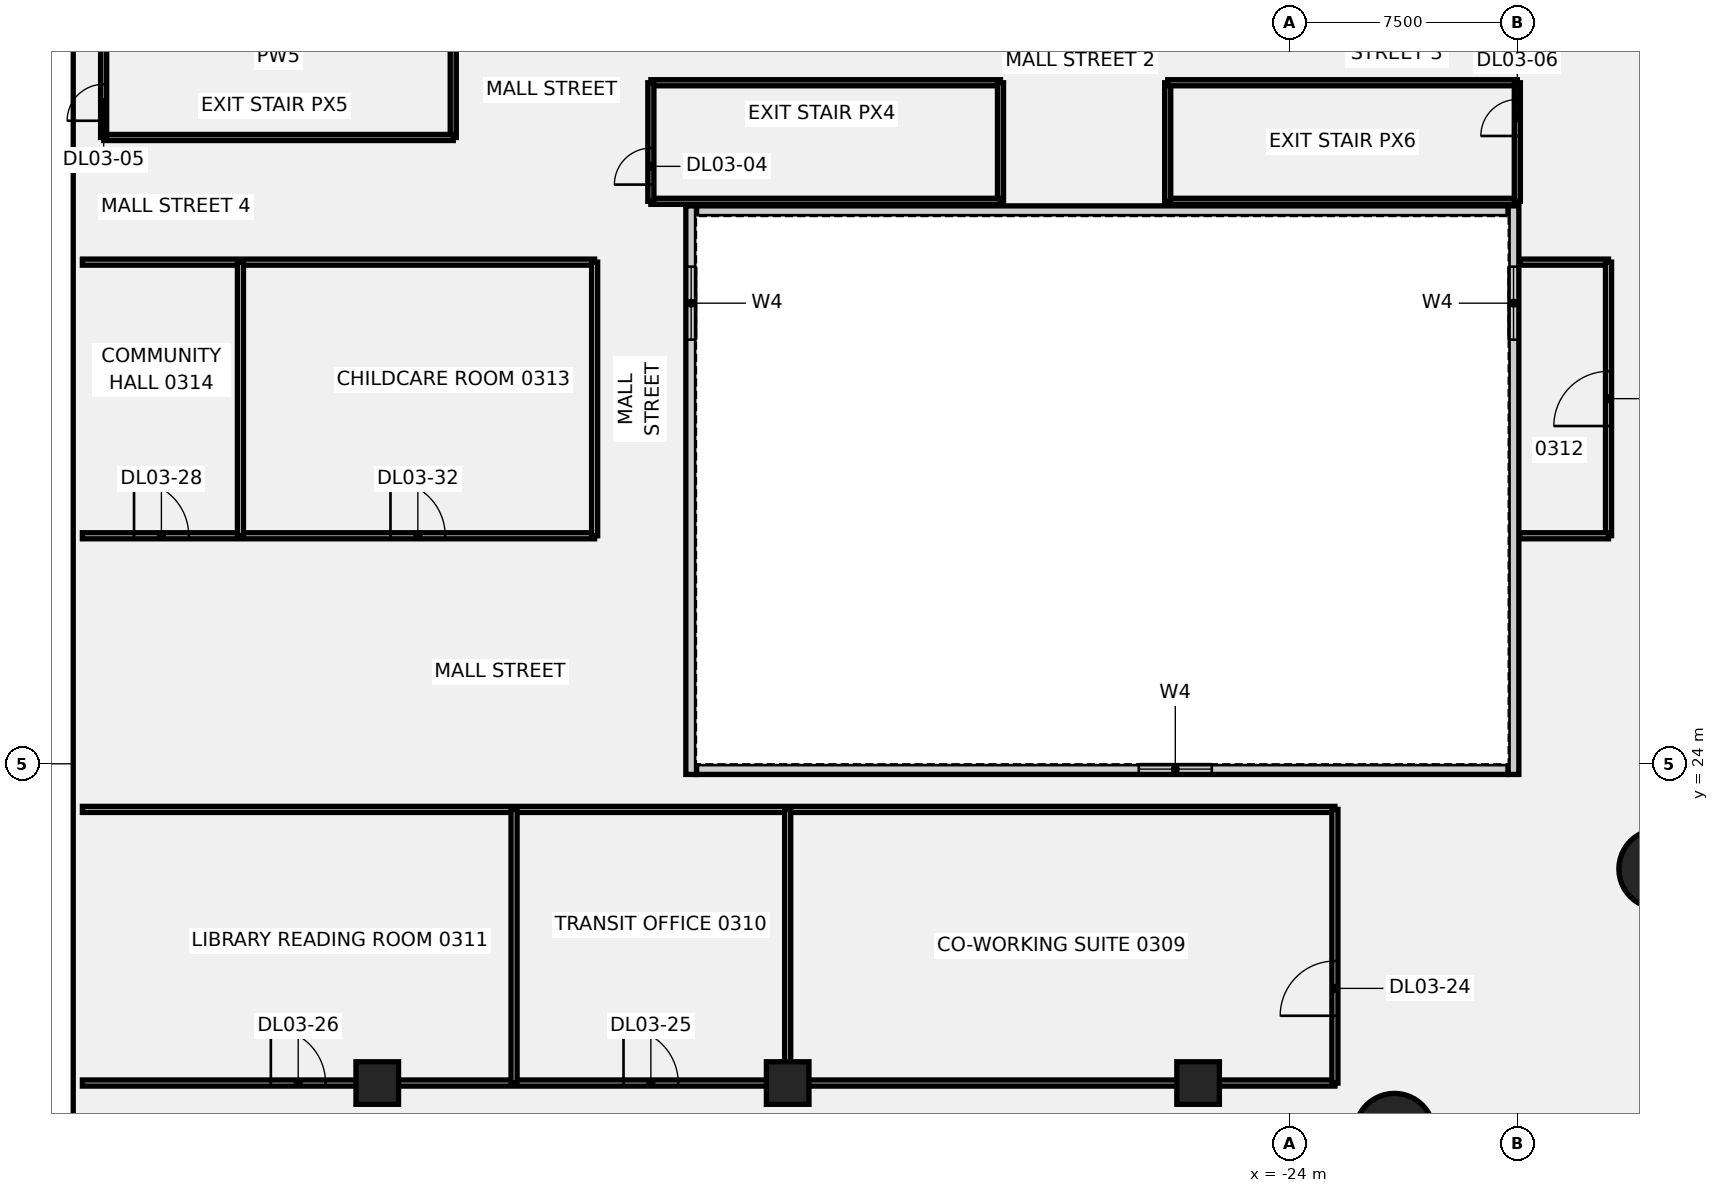
"""IFC4 building model, lengths in metres.
Left out: names, types, materials, properties, quantities, classifications, styles, units other than length and angle.
Written with IfcOpenShell. Run it as: python <this file> out.ifc"""

import sys

from ifc_helpers import new_model, si_unit, direction, frame, frame_2d, origin, origin_2d, place, context, subcontext, project, spatial, rectangle, circle, extrude, element, fill, save


model = new_model("IFC4")
c1 = context("Model", 3, precision=1e-05, world=origin(), true_north=direction((0.0, 1.0)))
c2 = subcontext(c1, "Body", "Model", "MODEL_VIEW")
j1 = project(units=[si_unit("LENGTHUNIT", "METRE"), si_unit("PLANEANGLEUNIT", "RADIAN")], contexts=[c1])
p1 = place(None, origin())
s1 = spatial("IfcSite", under=j1, at=p1, CompositionType="ELEMENT")
p2 = place(p1, origin())
s2 = spatial("IfcBuilding", under=s1, at=p2, CompositionType="ELEMENT")
p3 = place(p2, frame((0.0, 0.0, 20.0)))
s3 = spatial("IfcBuildingStorey", under=s2, at=p3, CompositionType="ELEMENT", Elevation=20.0)
for number, where, z_axis, x_axis in (
    (1, (-11.86, 20.543, -0.5), (0.0, 0.0, 1.0), (1.0, 0.0, 0.0)),
    (2, (-20.543, 11.86, -0.5), (0.0, 0.0, 1.0), (1.0, 0.0, 0.0)),
):
    element("IfcColumn", number, at=place(p3, frame(where, z_axis=z_axis, x_axis=x_axis)), inside=s3, PredefinedType="COLUMN", context=c2, shape_type="SweptSolid", body=[
        extrude(circle(Radius=1.3, at=origin_2d()), origin(), (0.0, 0.0, 1.0), 5.05),
    ])
for number, where, z_axis, x_axis in (
    (3, (-54.0, 13.5, -0.5), (0.0, 0.0, 1.0), (1.0, 0.0, 0.0)),
    (4, (-40.5, 13.5, -0.5), (0.0, 0.0, 1.0), (1.0, 0.0, 0.0)),
    (5, (-27.0, 13.5, -0.5), (0.0, 0.0, 1.0), (1.0, 0.0, 0.0)),
):
    element("IfcColumn", number, at=place(p3, frame(where, z_axis=z_axis, x_axis=x_axis)), inside=s3, PredefinedType="COLUMN", context=c2, shape_type="SweptSolid", body=[
        extrude(rectangle(XDim=1.4, YDim=1.4, at=origin_2d()), origin(), (0.0, 0.0, 1.0), 5.05),
    ])
p4 = place(p3, frame((-51.5, 44.6, 0.0), z_axis=(0.0, 0.0, 1.0), x_axis=(0.0, 1.0, 0.0)))
e6 = element("IfcWall", 6, at=p4, inside=s3, PredefinedType="PARTITIONING", context=c2, shape_type="SweptSolid", body=[
    extrude(rectangle(XDim=3.9, YDim=0.2, at=frame_2d((1.95, 0.0))), origin(), (0.0, 0.0, 1.0), 4.55),
])
p5 = place(p3, frame((-63.0, 44.6, 0.0), z_axis=(0.0, 0.0, 1.0), x_axis=(1.0, 0.0, 0.0)))
e7 = element("IfcWall", 7, at=p5, inside=s3, PredefinedType="PARTITIONING", context=c2, shape_type="SweptSolid", body=[
    extrude(rectangle(XDim=11.5, YDim=0.2, at=frame_2d((5.75, 0.0))), origin(), (0.0, 0.0, 1.0), 4.55),
])
p6 = place(p3, frame((-63.0, 44.6, 0.0), z_axis=(0.0, 0.0, 1.0), x_axis=(0.0, 1.0, 0.0)))
e8 = element("IfcWall", 8, at=p6, inside=s3, PredefinedType="PARTITIONING", context=c2, shape_type="SweptSolid", body=[
    extrude(rectangle(XDim=3.9, YDim=0.2, at=frame_2d((1.95, 0.0))), origin(), (0.0, 0.0, 1.0), 4.55),
])
p7 = place(p6, frame((0.55, 0.0, 0.0)))
e9 = element("IfcOpeningElement", 9, at=p7, cuts=e8, PredefinedType="OPENING", context=c2, shape_type="SweptSolid", body=[
    extrude(rectangle(XDim=1.2, YDim=2.1, at=frame_2d((0.6, 1.05))), frame((0.0, 0.11, 0.0), z_axis=(0.0, -1.0, 0.0), x_axis=(1.0, 0.0, 0.0)), (0.0, 0.0, 1.0), 0.22),
])
p8 = place(p3, frame((-45.0, 46.4, 0.0), z_axis=(0.0, 0.0, 1.0), x_axis=(1.0, 0.0, 0.0)))
e10 = element("IfcWall", 10, at=p8, inside=s3, PredefinedType="PARTITIONING", context=c2, shape_type="SweptSolid", body=[
    extrude(rectangle(XDim=11.5, YDim=0.2, at=frame_2d((5.75, 0.0))), origin(), (0.0, 0.0, 1.0), 4.55),
])
p9 = place(p3, frame((-33.5, 42.5, 0.0), z_axis=(0.0, 0.0, 1.0), x_axis=(0.0, 1.0, 0.0)))
e11 = element("IfcWall", 11, at=p9, inside=s3, PredefinedType="PARTITIONING", context=c2, shape_type="SweptSolid", body=[
    extrude(rectangle(XDim=3.9, YDim=0.2, at=frame_2d((1.95, 0.0))), origin(), (0.0, 0.0, 1.0), 4.55),
])
p10 = place(p3, frame((-45.0, 42.5, 0.0), z_axis=(0.0, 0.0, 1.0), x_axis=(1.0, 0.0, 0.0)))
e12 = element("IfcWall", 12, at=p10, inside=s3, PredefinedType="PARTITIONING", context=c2, shape_type="SweptSolid", body=[
    extrude(rectangle(XDim=11.5, YDim=0.2, at=frame_2d((5.75, 0.0))), origin(), (0.0, 0.0, 1.0), 4.55),
])
p11 = place(p3, frame((-45.0, 42.5, 0.0), z_axis=(0.0, 0.0, 1.0), x_axis=(0.0, 1.0, 0.0)))
e13 = element("IfcWall", 13, at=p11, inside=s3, PredefinedType="PARTITIONING", context=c2, shape_type="SweptSolid", body=[
    extrude(rectangle(XDim=3.9, YDim=0.2, at=frame_2d((1.95, 0.0))), origin(), (0.0, 0.0, 1.0), 4.55),
])
p12 = place(p11, frame((0.55, 0.0, 0.0)))
e14 = element("IfcOpeningElement", 14, at=p12, cuts=e13, PredefinedType="OPENING", context=c2, shape_type="SweptSolid", body=[
    extrude(rectangle(XDim=1.2, YDim=2.1, at=frame_2d((0.6, 1.05))), frame((0.0, 0.11, 0.0), z_axis=(0.0, -1.0, 0.0), x_axis=(1.0, 0.0, 0.0)), (0.0, 0.0, 1.0), 0.22),
])
p13 = place(p3, frame((-28.0, 42.5, 0.0), z_axis=(0.0, 0.0, 1.0), x_axis=(1.0, 0.0, 0.0)))
e15 = element("IfcWall", 15, at=p13, inside=s3, PredefinedType="PARTITIONING", context=c2, shape_type="SweptSolid", body=[
    extrude(rectangle(XDim=11.5, YDim=0.2, at=frame_2d((5.75, 0.0))), origin(), (0.0, 0.0, 1.0), 4.55),
])
p14 = place(p3, frame((-28.0, 42.5, 0.0), z_axis=(0.0, 0.0, 1.0), x_axis=(0.0, 1.0, 0.0)))
e16 = element("IfcWall", 16, at=p14, inside=s3, PredefinedType="PARTITIONING", context=c2, shape_type="SweptSolid", body=[
    extrude(rectangle(XDim=3.9, YDim=0.2, at=frame_2d((1.95, 0.0))), origin(), (0.0, 0.0, 1.0), 4.55),
])
p15 = place(p3, frame((-28.0, 46.4, 0.0), z_axis=(0.0, 0.0, 1.0), x_axis=(1.0, 0.0, 0.0)))
e17 = element("IfcWall", 17, at=p15, inside=s3, PredefinedType="PARTITIONING", context=c2, shape_type="SweptSolid", body=[
    extrude(rectangle(XDim=11.5, YDim=0.2, at=frame_2d((5.75, 0.0))), origin(), (0.0, 0.0, 1.0), 4.55),
])
p16 = place(p3, frame((-16.5, 42.5, 0.0), z_axis=(0.0, 0.0, 1.0), x_axis=(0.0, 1.0, 0.0)))
e18 = element("IfcWall", 18, at=p16, inside=s3, PredefinedType="PARTITIONING", context=c2, shape_type="SweptSolid", body=[
    extrude(rectangle(XDim=3.9, YDim=0.2, at=frame_2d((1.95, 0.0))), origin(), (0.0, 0.0, 1.0), 4.55),
])
p17 = place(p16, frame((2.15, 0.0, 0.0)))
e19 = element("IfcOpeningElement", 19, at=p17, cuts=e18, PredefinedType="OPENING", context=c2, shape_type="SweptSolid", body=[
    extrude(rectangle(XDim=1.2, YDim=2.1, at=frame_2d((0.6, 1.05))), frame((0.0, 0.11, 0.0), z_axis=(0.0, -1.0, 0.0), x_axis=(1.0, 0.0, 0.0)), (0.0, 0.0, 1.0), 0.22),
])
p18 = place(p3, frame((-63.699, 13.5, 0.0), z_axis=(0.0, 0.0, 1.0), x_axis=(1.0, 0.0, 0.0)))
e20 = element("IfcWall", 20, at=p18, inside=s3, PredefinedType="PARTITIONING", context=c2, shape_type="SweptSolid", body=[
    extrude(rectangle(XDim=41.199, YDim=0.2, at=frame_2d((20.6, 0.0))), origin(), (0.0, 0.0, 1.0), 4.55),
])
p19 = place(p18, frame((17.799, 0.0, 0.0)))
e21 = element("IfcOpeningElement", 21, at=p19, cuts=e20, PredefinedType="OPENING", context=c2, shape_type="SweptSolid", body=[
    extrude(rectangle(XDim=1.8, YDim=2.1, at=frame_2d((0.9, 1.05))), frame((0.0, 0.11, 0.0), z_axis=(0.0, -1.0, 0.0), x_axis=(1.0, 0.0, 0.0)), (0.0, 0.0, 1.0), 0.22),
])
p20 = place(p18, frame((6.199, 0.0, 0.0)))
e22 = element("IfcOpeningElement", 22, at=p20, cuts=e20, PredefinedType="OPENING", context=c2, shape_type="SweptSolid", body=[
    extrude(rectangle(XDim=1.8, YDim=2.1, at=frame_2d((0.9, 1.05))), frame((0.0, 0.11, 0.0), z_axis=(0.0, -1.0, 0.0), x_axis=(1.0, 0.0, 0.0)), (0.0, 0.0, 1.0), 0.22),
])
p21 = place(p3, frame((-63.699, 22.5, 0.0), z_axis=(0.0, 0.0, 1.0), x_axis=(1.0, 0.0, 0.0)))
e23 = element("IfcWall", 23, at=p21, inside=s3, PredefinedType="PARTITIONING", context=c2, shape_type="SweptSolid", body=[
    extrude(rectangle(XDim=41.199, YDim=0.2, at=frame_2d((20.6, 0.0))), origin(), (0.0, 0.0, 1.0), 4.55),
])
p22 = place(p3, frame((-63.699, 31.5, 0.0), z_axis=(0.0, 0.0, 1.0), x_axis=(1.0, 0.0, 0.0)))
e24 = element("IfcWall", 24, at=p22, inside=s3, PredefinedType="PARTITIONING", context=c2, shape_type="SweptSolid", body=[
    extrude(rectangle(XDim=16.849, YDim=0.2, at=frame_2d((8.424, 0.0))), origin(), (0.0, 0.0, 1.0), 4.55),
])
p23 = place(p22, frame((1.699, 0.0, 0.0)))
e25 = element("IfcOpeningElement", 25, at=p23, cuts=e24, PredefinedType="OPENING", context=c2, shape_type="SweptSolid", body=[
    extrude(rectangle(XDim=1.8, YDim=2.1, at=frame_2d((0.9, 1.05))), frame((0.0, 0.11, 0.0), z_axis=(0.0, -1.0, 0.0), x_axis=(1.0, 0.0, 0.0)), (0.0, 0.0, 1.0), 0.22),
])
p24 = place(p22, frame((10.134, 0.0, 0.0)))
e26 = element("IfcOpeningElement", 26, at=p24, cuts=e24, PredefinedType="OPENING", context=c2, shape_type="SweptSolid", body=[
    extrude(rectangle(XDim=1.8, YDim=2.1, at=frame_2d((0.9, 1.05))), frame((0.0, 0.11, 0.0), z_axis=(0.0, -1.0, 0.0), x_axis=(1.0, 0.0, 0.0)), (0.0, 0.0, 1.0), 0.22),
])
p25 = place(p3, frame((-63.699, 40.5, 0.0), z_axis=(0.0, 0.0, 1.0), x_axis=(1.0, 0.0, 0.0)))
e27 = element("IfcWall", 27, at=p25, inside=s3, PredefinedType="PARTITIONING", context=c2, shape_type="SweptSolid", body=[
    extrude(rectangle(XDim=16.849, YDim=0.2, at=frame_2d((8.424, 0.0))), origin(), (0.0, 0.0, 1.0), 4.55),
])
for number, where, z_axis, x_axis in (
    (28, (-46.85, 31.5, 0.0), (0.0, 0.0, 1.0), (0.0, 1.0, 0.0)),
    (29, (-58.5, 31.5, 0.0), (0.0, 0.0, 1.0), (0.0, 1.0, 0.0)),
    (30, (-49.5, 13.5, 0.0), (0.0, 0.0, 1.0), (0.0, 1.0, 0.0)),
):
    element("IfcWall", number, at=place(p3, frame(where, z_axis=z_axis, x_axis=x_axis)), inside=s3, PredefinedType="PARTITIONING", context=c2, shape_type="SweptSolid", body=[
        extrude(rectangle(XDim=9.0, YDim=0.2, at=frame_2d((4.5, 0.0))), origin(), (0.0, 0.0, 1.0), 4.55),
    ])
p26 = place(p3, frame((-22.5, 13.5, 0.0), z_axis=(0.0, 0.0, 1.0), x_axis=(0.0, 1.0, 0.0)))
e31 = element("IfcWall", 31, at=p26, inside=s3, PredefinedType="PARTITIONING", context=c2, shape_type="SweptSolid", body=[
    extrude(rectangle(XDim=9.0, YDim=0.2, at=frame_2d((4.5, 0.0))), origin(), (0.0, 0.0, 1.0), 4.55),
])
p27 = place(p26, frame((2.213, 0.0, 0.0)))
e32 = element("IfcOpeningElement", 32, at=p27, cuts=e31, PredefinedType="OPENING", context=c2, shape_type="SweptSolid", body=[
    extrude(rectangle(XDim=1.8, YDim=2.1, at=frame_2d((0.9, 1.05))), frame((0.0, 0.11, 0.0), z_axis=(0.0, -1.0, 0.0), x_axis=(1.0, 0.0, 0.0)), (0.0, 0.0, 1.0), 0.22),
])
p28 = place(p3, frame((-40.5, 13.5, 0.0), z_axis=(0.0, 0.0, 1.0), x_axis=(0.0, 1.0, 0.0)))
e33 = element("IfcWall", 33, at=p28, inside=s3, PredefinedType="PARTITIONING", context=c2, shape_type="SweptSolid", body=[
    extrude(rectangle(XDim=9.0, YDim=0.2, at=frame_2d((4.5, 0.0))), origin(), (0.0, 0.0, 1.0), 4.55),
])
p29 = place(p3, frame((-16.42, 40.5, 0.0), z_axis=(0.0, 0.0, 1.0), x_axis=(1.0, 0.0, 0.0)))
e34 = element("IfcWall", 34, at=p29, inside=s3, PredefinedType="PARTITIONING", context=c2, shape_type="SweptSolid", body=[
    extrude(rectangle(XDim=2.92, YDim=0.2, at=frame_2d((1.46, 0.0))), origin(), (0.0, 0.0, 1.0), 4.55),
])
p30 = place(p3, frame((-13.5, 31.5, 0.0), z_axis=(0.0, 0.0, 1.0), x_axis=(0.0, 1.0, 0.0)))
e35 = element("IfcWall", 35, at=p30, inside=s3, PredefinedType="PARTITIONING", context=c2, shape_type="SweptSolid", body=[
    extrude(rectangle(XDim=9.0, YDim=0.2, at=frame_2d((4.5, 0.0))), origin(), (0.0, 0.0, 1.0), 4.55),
])
p31 = place(p30, frame((3.61, 0.0, 0.0)))
e36 = element("IfcOpeningElement", 36, at=p31, cuts=e35, PredefinedType="OPENING", context=c2, shape_type="SweptSolid", body=[
    extrude(rectangle(XDim=1.8, YDim=2.1, at=frame_2d((0.9, 1.05))), frame((0.0, 0.11, 0.0), z_axis=(0.0, -1.0, 0.0), x_axis=(1.0, 0.0, 0.0)), (0.0, 0.0, 1.0), 0.22),
])
p32 = place(p3, frame((-16.42, 31.5, 0.0), z_axis=(0.0, 0.0, 1.0), x_axis=(1.0, 0.0, 0.0)))
e37 = element("IfcWall", 37, at=p32, inside=s3, PredefinedType="PARTITIONING", context=c2, shape_type="SweptSolid", body=[
    extrude(rectangle(XDim=2.92, YDim=0.2, at=frame_2d((1.46, 0.0))), origin(), (0.0, 0.0, 1.0), 4.55),
])
p33 = place(p3, frame((-43.5, 23.825, 0.0), z_axis=(0.0, 0.0, 1.0), x_axis=(1.0, 0.0, 0.0)))
e38 = element("IfcWall", 38, at=p33, inside=s3, PredefinedType="SOLIDWALL", context=c2, shape_type="SweptSolid", body=[
    extrude(rectangle(XDim=26.7, YDim=0.35, at=frame_2d((13.35, 0.0))), origin(), (0.0, 0.0, 1.0), 4.55),
])
p34 = place(p33, frame((14.55, 0.0, 1.0)))
e39 = element("IfcOpeningElement", 39, at=p34, cuts=e38, PredefinedType="OPENING", context=c2, shape_type="SweptSolid", body=[
    extrude(rectangle(XDim=2.4, YDim=1.8, at=frame_2d((1.2, 0.9))), frame((0.0, 0.185, 0.0), z_axis=(0.0, -1.0, 0.0), x_axis=(1.0, 0.0, 0.0)), (0.0, 0.0, 1.0), 0.37),
])
p35 = place(p3, frame((-43.5, 42.175, 0.0), z_axis=(0.0, 0.0, 1.0), x_axis=(1.0, 0.0, 0.0)))
e40 = element("IfcWall", 40, at=p35, inside=s3, PredefinedType="SOLIDWALL", context=c2, shape_type="SweptSolid", body=[
    extrude(rectangle(XDim=26.7, YDim=0.35, at=frame_2d((13.35, 0.0))), origin(), (0.0, 0.0, 1.0), 4.55),
])
p36 = place(p3, frame((-43.675, 23.65, 0.0), z_axis=(0.0, 0.0, 1.0), x_axis=(0.0, 1.0, 0.0)))
e41 = element("IfcWall", 41, at=p36, inside=s3, PredefinedType="SOLIDWALL", context=c2, shape_type="SweptSolid", body=[
    extrude(rectangle(XDim=18.7, YDim=0.35, at=frame_2d((9.35, 0.0))), origin(), (0.0, 0.0, 1.0), 4.55),
])
p37 = place(p36, frame((14.3, 0.0, 1.0)))
e42 = element("IfcOpeningElement", 42, at=p37, cuts=e41, PredefinedType="OPENING", context=c2, shape_type="SweptSolid", body=[
    extrude(rectangle(XDim=2.4, YDim=1.8, at=frame_2d((1.2, 0.9))), frame((0.0, 0.185, 0.0), z_axis=(0.0, -1.0, 0.0), x_axis=(1.0, 0.0, 0.0)), (0.0, 0.0, 1.0), 0.37),
])
p38 = place(p3, frame((-16.625, 23.65, 0.0), z_axis=(0.0, 0.0, 1.0), x_axis=(0.0, 1.0, 0.0)))
e43 = element("IfcWall", 43, at=p38, inside=s3, PredefinedType="SOLIDWALL", context=c2, shape_type="SweptSolid", body=[
    extrude(rectangle(XDim=18.7, YDim=0.35, at=frame_2d((9.35, 0.0))), origin(), (0.0, 0.0, 1.0), 4.55),
])
p39 = place(p38, frame((14.3, 0.0, 1.0)))
e44 = element("IfcOpeningElement", 44, at=p39, cuts=e43, PredefinedType="OPENING", context=c2, shape_type="SweptSolid", body=[
    extrude(rectangle(XDim=2.4, YDim=1.8, at=frame_2d((1.2, 0.9))), frame((0.0, 0.185, 0.0), z_axis=(0.0, -1.0, 0.0), x_axis=(1.0, 0.0, 0.0)), (0.0, 0.0, 1.0), 0.37),
])
p40 = place(p12, origin())
e45 = element("IfcDoor", 45, at=p40, inside=s3, OperationType="SINGLE_SWING_RIGHT", PredefinedType="DOOR", context=c2, shape_type="SweptSolid", body=[
    extrude(rectangle(XDim=1.2, YDim=2.1, at=frame_2d((0.6, 1.05))), frame((0.0, 0.025, 0.0), z_axis=(0.0, -1.0, 0.0), x_axis=(1.0, 0.0, 0.0)), (0.0, 0.0, 1.0), 0.05),
])
fill(e14, e45)
p41 = place(p7, origin())
e46 = element("IfcDoor", 46, at=p41, inside=s3, OperationType="SINGLE_SWING_LEFT", PredefinedType="DOOR", context=c2, shape_type="SweptSolid", body=[
    extrude(rectangle(XDim=1.2, YDim=2.1, at=frame_2d((0.6, 1.05))), frame((0.0, 0.025, 0.0), z_axis=(0.0, -1.0, 0.0), x_axis=(1.0, 0.0, 0.0)), (0.0, 0.0, 1.0), 0.05),
])
fill(e9, e46)
p42 = place(p17, origin())
e47 = element("IfcDoor", 47, at=p42, inside=s3, OperationType="SINGLE_SWING_RIGHT", PredefinedType="DOOR", context=c2, shape_type="SweptSolid", body=[
    extrude(rectangle(XDim=1.2, YDim=2.1, at=frame_2d((0.6, 1.05))), frame((0.0, 0.025, 0.0), z_axis=(0.0, -1.0, 0.0), x_axis=(1.0, 0.0, 0.0)), (0.0, 0.0, 1.0), 0.05),
])
fill(e19, e47)
p43 = place(p27, origin())
e48 = element("IfcDoor", 48, at=p43, inside=s3, OperationType="SINGLE_SWING_RIGHT", PredefinedType="DOOR", context=c2, shape_type="SweptSolid", body=[
    extrude(rectangle(XDim=1.8, YDim=2.1, at=frame_2d((0.9, 1.05))), frame((0.0, 0.025, 0.0), z_axis=(0.0, -1.0, 0.0), x_axis=(1.0, 0.0, 0.0)), (0.0, 0.0, 1.0), 0.05),
])
fill(e32, e48)
p44 = place(p19, origin())
e49 = element("IfcDoor", 49, at=p44, inside=s3, OperationType="SINGLE_SWING_LEFT", PredefinedType="DOOR", context=c2, shape_type="SweptSolid", body=[
    extrude(rectangle(XDim=1.8, YDim=2.1, at=frame_2d((0.9, 1.05))), frame((0.0, 0.025, 0.0), z_axis=(0.0, -1.0, 0.0), x_axis=(1.0, 0.0, 0.0)), (0.0, 0.0, 1.0), 0.05),
])
fill(e21, e49)
p45 = place(p20, origin())
e50 = element("IfcDoor", 50, at=p45, inside=s3, OperationType="SINGLE_SWING_RIGHT", PredefinedType="DOOR", context=c2, shape_type="SweptSolid", body=[
    extrude(rectangle(XDim=1.8, YDim=2.1, at=frame_2d((0.9, 1.05))), frame((0.0, 0.025, 0.0), z_axis=(0.0, -1.0, 0.0), x_axis=(1.0, 0.0, 0.0)), (0.0, 0.0, 1.0), 0.05),
])
fill(e22, e50)
p46 = place(p31, origin())
e51 = element("IfcDoor", 51, at=p46, inside=s3, OperationType="SINGLE_SWING_LEFT", PredefinedType="DOOR", context=c2, shape_type="SweptSolid", body=[
    extrude(rectangle(XDim=1.8, YDim=2.1, at=frame_2d((0.9, 1.05))), frame((0.0, 0.025, 0.0), z_axis=(0.0, -1.0, 0.0), x_axis=(1.0, 0.0, 0.0)), (0.0, 0.0, 1.0), 0.05),
])
fill(e36, e51)
p47 = place(p23, origin())
e52 = element("IfcDoor", 52, at=p47, inside=s3, OperationType="SINGLE_SWING_RIGHT", PredefinedType="DOOR", context=c2, shape_type="SweptSolid", body=[
    extrude(rectangle(XDim=1.8, YDim=2.1, at=frame_2d((0.9, 1.05))), frame((0.0, 0.025, 0.0), z_axis=(0.0, -1.0, 0.0), x_axis=(1.0, 0.0, 0.0)), (0.0, 0.0, 1.0), 0.05),
])
fill(e25, e52)
p48 = place(p24, origin())
e53 = element("IfcDoor", 53, at=p48, inside=s3, OperationType="SINGLE_SWING_RIGHT", PredefinedType="DOOR", context=c2, shape_type="SweptSolid", body=[
    extrude(rectangle(XDim=1.8, YDim=2.1, at=frame_2d((0.9, 1.05))), frame((0.0, 0.025, 0.0), z_axis=(0.0, -1.0, 0.0), x_axis=(1.0, 0.0, 0.0)), (0.0, 0.0, 1.0), 0.05),
])
fill(e26, e53)
p49 = place(p34, origin())
e54 = element("IfcWindow", 54, at=p49, inside=s3, PartitioningType="SINGLE_PANEL", PredefinedType="WINDOW", context=c2, shape_type="SweptSolid", body=[
    extrude(rectangle(XDim=2.4, YDim=1.8, at=frame_2d((1.2, 0.9))), frame((0.0, 0.03, 0.0), z_axis=(0.0, -1.0, 0.0), x_axis=(1.0, 0.0, 0.0)), (0.0, 0.0, 1.0), 0.06),
])
fill(e39, e54)
p50 = place(p37, origin())
e55 = element("IfcWindow", 55, at=p50, inside=s3, PartitioningType="SINGLE_PANEL", PredefinedType="WINDOW", context=c2, shape_type="SweptSolid", body=[
    extrude(rectangle(XDim=2.4, YDim=1.8, at=frame_2d((1.2, 0.9))), frame((0.0, 0.03, 0.0), z_axis=(0.0, -1.0, 0.0), x_axis=(1.0, 0.0, 0.0)), (0.0, 0.0, 1.0), 0.06),
])
fill(e42, e55)
p51 = place(p39, origin())
e56 = element("IfcWindow", 56, at=p51, inside=s3, PartitioningType="SINGLE_PANEL", PredefinedType="WINDOW", context=c2, shape_type="SweptSolid", body=[
    extrude(rectangle(XDim=2.4, YDim=1.8, at=frame_2d((1.2, 0.9))), frame((0.0, 0.03, 0.0), z_axis=(0.0, -1.0, 0.0), x_axis=(1.0, 0.0, 0.0)), (0.0, 0.0, 1.0), 0.06),
])
fill(e44, e56)
save(model, sys.argv[1])
